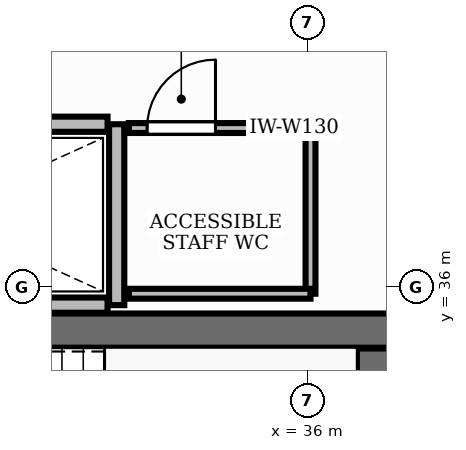
"""IFC4 building model, lengths in metres.
Left out: names, types, materials, properties, quantities, classifications, styles, units other than length and angle.
Written with IfcOpenShell. Run it as: python <this file> out.ifc"""

import sys

from ifc_helpers import new_model, si_unit, direction, frame, frame_2d, origin, place, context, subcontext, project, spatial, rectangle, extrude, element, fill, save


model = new_model("IFC4")
c1 = context("Model", 3, precision=1e-05, world=origin(), true_north=direction((0.0, 1.0)))
c2 = subcontext(c1, "Body", "Model", "MODEL_VIEW")
j1 = project(units=[si_unit("LENGTHUNIT", "METRE"), si_unit("PLANEANGLEUNIT", "RADIAN")], contexts=[c1])
p1 = place(None, origin())
s1 = spatial("IfcSite", under=j1, at=p1, CompositionType="ELEMENT")
p2 = place(p1, origin())
s2 = spatial("IfcBuilding", under=s1, at=p2, CompositionType="ELEMENT")
p3 = place(p2, frame((0.0, 0.0, 67.8)))
s3 = spatial("IfcBuildingStorey", under=s2, at=p3, CompositionType="ELEMENT", Elevation=67.8)
p4 = place(p3, frame((28.852, 35.425, 0.0), z_axis=(0.0, 0.0, 1.0), x_axis=(1.0, 0.0, 0.0)))
e1 = element("IfcWall", 1, at=p4, inside=s3, PredefinedType="SHEAR", context=c2, shape_type="SweptSolid", body=[
    extrude(rectangle(XDim=8.248, YDim=0.45, at=frame_2d((4.124, 0.0))), origin(), (0.0, 0.0, 1.0), 3.9),
])
p5 = place(p3, frame((36.875, 32.11, 0.0), z_axis=(0.0, 0.0, 1.0), x_axis=(0.0, 1.0, 0.0)))
e2 = element("IfcWall", 2, at=p5, inside=s3, PredefinedType="SHEAR", context=c2, shape_type="SweptSolid", body=[
    extrude(rectangle(XDim=3.08, YDim=0.45, at=frame_2d((1.54, 0.0))), origin(), (0.0, 0.0, 1.0), 3.9),
])
p6 = place(p3, frame((33.49, 35.76, 0.0), z_axis=(0.0, 0.0, 1.0), x_axis=(0.0, 1.0, 0.0)))
e3 = element("IfcWall", 3, at=p6, inside=s3, PredefinedType="PARTITIONING", context=c2, shape_type="SweptSolid", body=[
    extrude(rectangle(XDim=2.38, YDim=0.2, at=frame_2d((1.19, 0.0))), origin(), (0.0, 0.0, 1.0), 2.91),
])
for number, where, z_axis, x_axis in (
    (4, (28.8, 35.76, 0.0), (0.0, 0.0, 1.0), (1.0, 0.0, 0.0)),
    (5, (28.8, 38.14, 0.0), (0.0, 0.0, 1.0), (1.0, 0.0, 0.0)),
):
    element("IfcWall", number, at=place(p3, frame(where, z_axis=z_axis, x_axis=x_axis)), inside=s3, PredefinedType="PARTITIONING", context=c2, shape_type="SweptSolid", body=[
        extrude(rectangle(XDim=4.57, YDim=0.2, at=frame_2d((2.285, 0.0))), origin(), (0.0, 0.0, 1.0), 2.91),
    ])
p7 = place(p3, frame((33.65, 38.09, 0.0), z_axis=(0.0, 0.0, 1.0), x_axis=(0.999999994783, -0.000102145045, 0.0)))
e6 = element("IfcWall", 6, at=p7, inside=s3, PredefinedType="PARTITIONING", context=c2, shape_type="SweptSolid", body=[
    extrude(rectangle(XDim=2.39, YDim=0.13, at=frame_2d((1.195, 0.0))), origin(), (0.0, 0.0, 1.0), 2.91),
])
p8 = place(p7, frame((0.24, 0.0, 0.0)))
e7 = element("IfcOpeningElement", 7, at=p8, cuts=e6, PredefinedType="OPENING", context=c2, shape_type="SweptSolid", body=[
    extrude(rectangle(XDim=0.9, YDim=2.15, at=frame_2d((0.45, 1.075))), frame((0.0, 0.08, 0.0), z_axis=(0.0, -1.0, 0.0), x_axis=(1.0, 0.0, 0.0)), (0.0, 0.0, 1.0), 0.16),
])
p9 = place(p3, frame((36.04, 38.09, 0.0), z_axis=(0.0, 0.0, 1.0), x_axis=(0.0, -1.0, 0.0)))
e8 = element("IfcWall", 8, at=p9, inside=s3, PredefinedType="PARTITIONING", context=c2, shape_type="SweptSolid", body=[
    extrude(rectangle(XDim=2.18, YDim=0.13, at=frame_2d((1.09, 0.0))), origin(), (0.0, 0.0, 1.0), 2.91),
])
p10 = place(p3, frame((36.04, 35.91, 0.0), z_axis=(0.0, 0.0, 1.0), x_axis=(-1.0, 0.0, 0.0)))
e9 = element("IfcWall", 9, at=p10, inside=s3, PredefinedType="PARTITIONING", context=c2, shape_type="SweptSolid", body=[
    extrude(rectangle(XDim=2.39, YDim=0.13, at=frame_2d((1.195, 0.0))), origin(), (0.0, 0.0, 1.0), 2.91),
])
p11 = place(p8, origin())
e10 = element("IfcDoor", 10, at=p11, inside=s3, OperationType="SINGLE_SWING_RIGHT", PredefinedType="DOOR", context=c2, shape_type="SweptSolid", body=[
    extrude(rectangle(XDim=0.9, YDim=2.15, at=frame_2d((0.45, 1.075))), frame((0.0, 0.025, 0.0), z_axis=(0.0, -1.0, 0.0), x_axis=(1.0, 0.0, 0.0)), (0.0, 0.0, 1.0), 0.05),
])
fill(e7, e10)
save(model, sys.argv[1])
